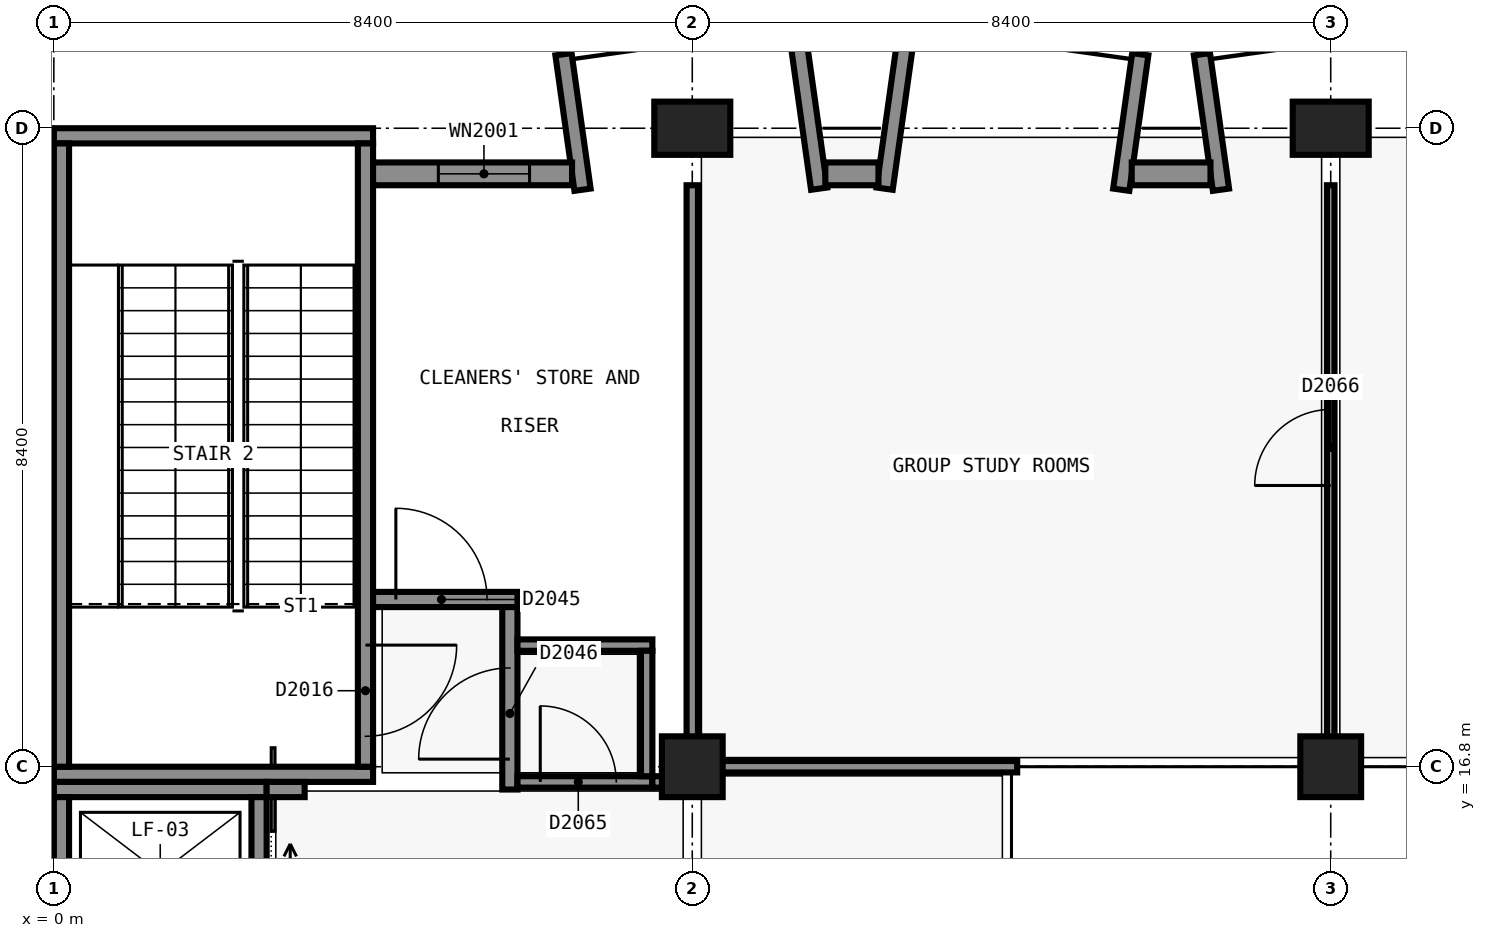
"""IFC4 building model, lengths in metres.
Left out: names, types, materials, properties, quantities, classifications, styles, units other than length and angle.
Written with IfcOpenShell. Run it as: python <this file> out.ifc"""

import sys

from ifc_helpers import new_model, si_unit, direction, frame, frame_2d, origin, origin_2d, place, context, subcontext, project, spatial, rectangle, extrude, element, fill, save


model = new_model("IFC4")
c1 = context("Model", 3, precision=1e-05, world=origin(), true_north=direction((0.0, 1.0)))
c2 = subcontext(c1, "Body", "Model", "MODEL_VIEW")
j1 = project(units=[si_unit("LENGTHUNIT", "METRE"), si_unit("PLANEANGLEUNIT", "RADIAN")], contexts=[c1])
p1 = place(None, origin())
s1 = spatial("IfcSite", under=j1, at=p1, CompositionType="ELEMENT")
p2 = place(p1, origin())
s2 = spatial("IfcBuilding", under=s1, at=p2, CompositionType="ELEMENT")
p3 = place(p2, frame((0.0, 0.0, 10.2)))
s3 = spatial("IfcBuildingStorey", under=s2, at=p3, CompositionType="ELEMENT", Elevation=10.2)
for number, where, z_axis, x_axis in (
    (1, (4.2, 16.7, 0.0), (0.0, 0.0, 1.0), (-1.0, 0.0, 0.0)),
    (2, (0.0, 25.1, 0.0), (0.0, 0.0, 1.0), (1.0, 0.0, 0.0)),
):
    element("IfcWall", number, at=place(p3, frame(where, z_axis=z_axis, x_axis=x_axis)), inside=s3, PredefinedType="SHEAR", context=c2, shape_type="SweptSolid", body=[
        extrude(rectangle(XDim=4.199, YDim=0.2, at=frame_2d((2.1, 0.0))), origin(), (0.0, 0.0, 1.0), 4.8),
    ])
p4 = place(p3, frame((0.1, 16.8, 0.0), z_axis=(0.0, 0.0, 1.0), x_axis=(0.0, 1.0, 0.0)))
e3 = element("IfcWall", 3, at=p4, inside=s3, PredefinedType="SHEAR", context=c2, shape_type="SweptSolid", body=[
    extrude(rectangle(XDim=8.2, YDim=0.2, at=frame_2d((4.1, 0.0))), origin(), (0.0, 0.0, 1.0), 4.8),
])
p5 = place(p3, frame((4.1, 25.0, 0.0), z_axis=(0.0, 0.0, 1.0), x_axis=(0.0, -1.0, 0.0)))
e4 = element("IfcWall", 4, at=p5, inside=s3, PredefinedType="SHEAR", context=c2, shape_type="SweptSolid", body=[
    extrude(rectangle(XDim=8.2, YDim=0.2, at=frame_2d((4.1, 0.0))), origin(), (0.0, 0.0, 1.0), 4.8),
])
p6 = place(p5, frame((6.6, 0.0, 0.0)))
e5 = element("IfcOpeningElement", 5, at=p6, cuts=e4, PredefinedType="OPENING", context=c2, shape_type="SweptSolid", body=[
    extrude(rectangle(XDim=1.2, YDim=2.1, at=frame_2d((0.6, 1.05))), frame((0.0, 0.11, 0.0), z_axis=(0.0, -1.0, 0.0), x_axis=(1.0, 0.0, 0.0)), (0.0, 0.0, 1.0), 0.22),
])
p7 = place(p3, frame((0.0, 16.5, 0.0), z_axis=(0.0, 0.0, 1.0), x_axis=(1.0, 0.0, 0.0)))
e6 = element("IfcWall", 6, at=p7, inside=s3, PredefinedType="SHEAR", context=c2, shape_type="SweptSolid", body=[
    extrude(rectangle(XDim=2.8, YDim=0.2, at=frame_2d((1.4, 0.0))), origin(), (0.0, 0.0, 1.0), 4.8),
])
p8 = place(p3, frame((0.1, 14.3, 0.0), z_axis=(0.0, 0.0, 1.0), x_axis=(0.0, 1.0, 0.0)))
e7 = element("IfcWall", 7, at=p8, inside=s3, PredefinedType="SHEAR", context=c2, shape_type="SweptSolid", body=[
    extrude(rectangle(XDim=2.1, YDim=0.2, at=frame_2d((1.05, 0.0))), origin(), (0.0, 0.0, 1.0), 4.8),
])
p9 = place(p3, frame((2.7, 16.4, 0.0), z_axis=(0.0, 0.0, 1.0), x_axis=(0.0, -1.0, 0.0)))
e8 = element("IfcWall", 8, at=p9, inside=s3, PredefinedType="SHEAR", context=c2, shape_type="SweptSolid", body=[
    extrude(rectangle(XDim=2.1, YDim=0.2, at=frame_2d((1.05, 0.0))), origin(), (0.0, 0.0, 1.0), 4.8),
])
p10 = place(p9, frame((0.45, 0.0, 0.0)))
e9 = element("IfcOpeningElement", 9, at=p10, cuts=e8, PredefinedType="OPENING", context=c2, shape_type="SweptSolid", body=[
    extrude(rectangle(XDim=1.1, YDim=2.1, at=frame_2d((0.55, 1.05))), frame((0.0, 0.11, 0.0), z_axis=(0.0, -1.0, 0.0), x_axis=(1.0, 0.0, 0.0)), (0.0, 0.0, 1.0), 0.22),
])
p11 = place(p3, frame((8.4, 16.8, 0.0), z_axis=(0.0, 0.0, 1.0), x_axis=(1.0, 0.0, 0.0)))
e10 = element("IfcColumn", 10, at=p11, inside=s3, PredefinedType="COLUMN", context=c2, shape_type="SweptSolid", body=[
    extrude(rectangle(XDim=0.8, YDim=0.8, at=origin_2d()), origin(), (0.0, 0.0, 1.0), 4.8),
])
p12 = place(p3, frame((8.4, 25.2, 0.0), z_axis=(0.0, 0.0, 1.0), x_axis=(1.0, 0.0, 0.0)))
e11 = element("IfcColumn", 11, at=p12, inside=s3, PredefinedType="COLUMN", context=c2, shape_type="SweptSolid", body=[
    extrude(rectangle(XDim=1.0, YDim=0.7, at=origin_2d()), origin(), (0.0, 0.0, 1.0), 4.8),
])
p13 = place(p3, frame((16.8, 16.8, 0.0), z_axis=(0.0, 0.0, 1.0), x_axis=(1.0, 0.0, 0.0)))
e12 = element("IfcColumn", 12, at=p13, inside=s3, PredefinedType="COLUMN", context=c2, shape_type="SweptSolid", body=[
    extrude(rectangle(XDim=0.8, YDim=0.8, at=origin_2d()), origin(), (0.0, 0.0, 1.0), 4.8),
])
p14 = place(p3, frame((16.8, 25.2, 0.0), z_axis=(0.0, 0.0, 1.0), x_axis=(1.0, 0.0, 0.0)))
e13 = element("IfcColumn", 13, at=p14, inside=s3, PredefinedType="COLUMN", context=c2, shape_type="SweptSolid", body=[
    extrude(rectangle(XDim=1.0, YDim=0.7, at=origin_2d()), origin(), (0.0, 0.0, 1.0), 4.8),
])
p15 = place(p3, frame((2.8, 16.5, 0.0), z_axis=(0.0, 0.0, 1.0), x_axis=(1.0, 0.0, 0.0)))
e14 = element("IfcWall", 14, at=p15, inside=s3, PredefinedType="SHEAR", context=c2, shape_type="SweptSolid", body=[
    extrude(rectangle(XDim=0.5, YDim=0.2, at=frame_2d((0.25, 0.0))), origin(), (0.0, 0.0, 1.0), 4.8),
])
p16 = place(p3, frame((6.956, 24.391, 0.0), z_axis=(0.0, 0.0, 1.0), x_axis=(-0.139161311926, 0.990269725511, 0.0)))
e15 = element("IfcWall", 15, at=p16, inside=s3, PredefinedType="SOLIDWALL", context=c2, shape_type="SweptSolid", body=[
    extrude(rectangle(XDim=1.8, YDim=0.215, at=frame_2d((0.9, 0.0))), origin(), (0.0, 0.0, 1.0), 4.5),
])
for number, where, z_axis, x_axis in (
    (16, (10.069, 24.405, 0.0), (0.0, 0.0, 1.0), (-0.139, 0.99, 0.0)),
    (17, (10.931, 24.405, 0.0), (0.0, 0.0, 1.0), (0.139, 0.99, 0.0)),
):
    element("IfcWall", number, at=place(p3, frame(where, z_axis=z_axis, x_axis=x_axis)), inside=s3, PredefinedType="SOLIDWALL", context=c2, shape_type="SweptSolid", body=[
        extrude(rectangle(XDim=2.219, YDim=0.215, at=frame_2d((1.11, 0.0))), origin(), (0.0, 0.0, 1.0), 4.5),
    ])
for number, where, z_axis, x_axis in (
    (18, (14.044, 24.391, 0.0), (0.0, 0.0, 1.0), (0.139, 0.99, 0.0)),
    (19, (15.356, 24.391, 0.0), (0.0, 0.0, 1.0), (-0.139, 0.99, 0.0)),
):
    element("IfcWall", number, at=place(p3, frame(where, z_axis=z_axis, x_axis=x_axis)), inside=s3, PredefinedType="SOLIDWALL", context=c2, shape_type="SweptSolid", body=[
        extrude(rectangle(XDim=1.8, YDim=0.215, at=frame_2d((0.9, 0.0))), origin(), (0.0, 0.0, 1.0), 4.5),
    ])
p17 = place(p3, frame((4.2, 24.6, 0.0), z_axis=(0.0, 0.0, 1.0), x_axis=(1.0, 0.0, 0.0)))
e20 = element("IfcWall", 20, at=p17, inside=s3, PredefinedType="SOLIDWALL", context=c2, shape_type="SweptSolid", body=[
    extrude(rectangle(XDim=2.618, YDim=0.3, at=frame_2d((1.309, 0.0))), origin(), (0.0, 0.0, 1.0), 4.5),
])
p18 = place(p17, frame((0.859, 0.0, 0.9)))
e21 = element("IfcOpeningElement", 21, at=p18, cuts=e20, PredefinedType="OPENING", context=c2, shape_type="SweptSolid", body=[
    extrude(rectangle(XDim=1.2, YDim=1.5, at=frame_2d((0.6, 0.75))), frame((0.0, 0.16, 0.0), z_axis=(0.0, -1.0, 0.0), x_axis=(1.0, 0.0, 0.0)), (0.0, 0.0, 1.0), 0.32),
])
p19 = place(p3, frame((10.15, 24.6, 0.0), z_axis=(0.0, 0.0, 1.0), x_axis=(1.0, 0.0, 0.0)))
e22 = element("IfcWall", 22, at=p19, inside=s3, PredefinedType="SOLIDWALL", context=c2, shape_type="SweptSolid", body=[
    extrude(rectangle(XDim=0.699, YDim=0.3, at=frame_2d((0.35, 0.0))), origin(), (0.0, 0.0, 1.0), 4.5),
])
p20 = place(p3, frame((14.182, 24.6, 0.0), z_axis=(0.0, 0.0, 1.0), x_axis=(1.0, 0.0, 0.0)))
e23 = element("IfcWall", 23, at=p20, inside=s3, PredefinedType="SOLIDWALL", context=c2, shape_type="SweptSolid", body=[
    extrude(rectangle(XDim=1.036, YDim=0.3, at=frame_2d((0.518, 0.0))), origin(), (0.0, 0.0, 1.0), 4.5),
])
p21 = place(p3, frame((4.2, 19.0, 0.0), z_axis=(0.0, 0.0, 1.0), x_axis=(1.0, 0.0, 0.0)))
e24 = element("IfcWall", 24, at=p21, inside=s3, PredefinedType="SOLIDWALL", context=c2, shape_type="SweptSolid", body=[
    extrude(rectangle(XDim=1.9, YDim=0.2, at=frame_2d((0.95, 0.0))), origin(), (0.0, 0.0, 1.0), 4.5),
])
p22 = place(p21, frame((0.3, 0.0, 0.0)))
e25 = element("IfcOpeningElement", 25, at=p22, cuts=e24, PredefinedType="OPENING", context=c2, shape_type="SweptSolid", body=[
    extrude(rectangle(XDim=1.2, YDim=2.1, at=frame_2d((0.6, 1.05))), frame((0.0, 0.11, 0.0), z_axis=(0.0, -1.0, 0.0), x_axis=(1.0, 0.0, 0.0)), (0.0, 0.0, 1.0), 0.22),
])
p23 = place(p3, frame((6.0, 16.5, 0.0), z_axis=(0.0, 0.0, 1.0), x_axis=(0.0, 1.0, 0.0)))
e26 = element("IfcWall", 26, at=p23, inside=s3, PredefinedType="SOLIDWALL", context=c2, shape_type="SweptSolid", body=[
    extrude(rectangle(XDim=2.4, YDim=0.2, at=frame_2d((1.2, 0.0))), origin(), (0.0, 0.0, 1.0), 4.0),
])
p24 = place(p23, frame((0.4, 0.0, 0.0)))
e27 = element("IfcOpeningElement", 27, at=p24, cuts=e26, PredefinedType="OPENING", context=c2, shape_type="SweptSolid", body=[
    extrude(rectangle(XDim=1.2, YDim=2.1, at=frame_2d((0.6, 1.05))), frame((0.0, 0.11, 0.0), z_axis=(0.0, -1.0, 0.0), x_axis=(1.0, 0.0, 0.0)), (0.0, 0.0, 1.0), 0.22),
])
p25 = place(p3, frame((6.1, 16.6, 0.0), z_axis=(0.0, 0.0, 1.0), x_axis=(1.0, 0.0, 0.0)))
e28 = element("IfcWall", 28, at=p25, inside=s3, PredefinedType="PARTITIONING", context=c2, shape_type="SweptSolid", body=[
    extrude(rectangle(XDim=1.775, YDim=0.15, at=frame_2d((0.887, 0.0))), origin(), (0.0, 0.0, 1.0), 4.0),
])
p26 = place(p25, frame((0.3, 0.0, 0.0)))
e29 = element("IfcOpeningElement", 29, at=p26, cuts=e28, PredefinedType="OPENING", context=c2, shape_type="SweptSolid", body=[
    extrude(rectangle(XDim=1.0, YDim=2.1, at=frame_2d((0.5, 1.05))), frame((0.0, 0.085, 0.0), z_axis=(0.0, -1.0, 0.0), x_axis=(1.0, 0.0, 0.0)), (0.0, 0.0, 1.0), 0.17),
])
p27 = place(p3, frame((8.325, 16.8, 0.0), z_axis=(0.0, 0.0, 1.0), x_axis=(1.0, 0.0, 0.0)))
e30 = element("IfcWall", 30, at=p27, inside=s3, PredefinedType="PARTITIONING", context=c2, shape_type="SweptSolid", body=[
    extrude(rectangle(XDim=4.35, YDim=0.15, at=frame_2d((2.175, 0.0))), origin(), (0.0, 0.0, 1.0), 3.8),
])
p28 = place(p3, frame((7.875, 16.6, 0.0), z_axis=(0.0, 0.0, 1.0), x_axis=(1.0, 0.0, 0.0)))
e31 = element("IfcWall", 31, at=p28, inside=s3, PredefinedType="SOLIDWALL", context=c2, shape_type="SweptSolid", body=[
    extrude(rectangle(XDim=0.6, YDim=0.15, at=frame_2d((0.3, 0.0))), origin(), (0.0, 0.0, 1.0), 3.8),
])
p29 = place(p3, frame((6.1, 18.4, 0.0), z_axis=(0.0, 0.0, 1.0), x_axis=(1.0, 0.0, 0.0)))
e32 = element("IfcWall", 32, at=p29, inside=s3, PredefinedType="SOLIDWALL", context=c2, shape_type="SweptSolid", body=[
    extrude(rectangle(XDim=1.775, YDim=0.15, at=frame_2d((0.887, 0.0))), origin(), (0.0, 0.0, 1.0), 4.5),
])
p30 = place(p3, frame((7.8, 16.675, 0.0), z_axis=(0.0, 0.0, 1.0), x_axis=(0.0, 1.0, 0.0)))
e33 = element("IfcWall", 33, at=p30, inside=s3, PredefinedType="SOLIDWALL", context=c2, shape_type="SweptSolid", body=[
    extrude(rectangle(XDim=1.65, YDim=0.15, at=frame_2d((0.825, 0.0))), origin(), (0.0, 0.0, 1.0), 4.0),
])
p31 = place(p3, frame((8.4, 16.875, 0.0), z_axis=(0.0, 0.0, 1.0), x_axis=(0.0, 1.0, 0.0)))
e34 = element("IfcWall", 34, at=p31, inside=s3, PredefinedType="SOLIDWALL", context=c2, shape_type="SweptSolid", body=[
    extrude(rectangle(XDim=7.575, YDim=0.15, at=frame_2d((3.788, 0.0))), origin(), (0.0, 0.0, 1.0), 3.8),
])
p32 = place(p3, frame((16.8, 16.75, 0.0), z_axis=(0.0, 0.0, 1.0), x_axis=(0.0, 1.0, 0.0)))
e35 = element("IfcWall", 35, at=p32, inside=s3, PredefinedType="PARTITIONING", context=c2, shape_type="SweptSolid", body=[
    extrude(rectangle(XDim=7.7, YDim=0.1, at=frame_2d((3.85, 0.0))), origin(), (0.0, 0.0, 1.0), 3.8),
])
p33 = place(p32, frame((3.75, 0.0, 0.0)))
e36 = element("IfcOpeningElement", 36, at=p33, cuts=e35, PredefinedType="OPENING", context=c2, shape_type="SweptSolid", body=[
    extrude(rectangle(XDim=1.0, YDim=2.1, at=frame_2d((0.5, 1.05))), frame((0.0, 0.06, 0.0), z_axis=(0.0, -1.0, 0.0), x_axis=(1.0, 0.0, 0.0)), (0.0, 0.0, 1.0), 0.12),
])
p34 = place(p18, origin())
e37 = element("IfcWindow", 37, at=p34, inside=s3, PartitioningType="SINGLE_PANEL", PredefinedType="WINDOW", context=c2, shape_type="SweptSolid", body=[
    extrude(rectangle(XDim=1.2, YDim=1.5, at=frame_2d((0.6, 0.75))), frame((0.0, 0.03, 0.0), z_axis=(0.0, -1.0, 0.0), x_axis=(1.0, 0.0, 0.0)), (0.0, 0.0, 1.0), 0.06),
])
fill(e21, e37)
p35 = place(p10, origin())
e38 = element("IfcDoor", 38, at=p35, inside=s3, OperationType="SLIDING_TO_LEFT", PredefinedType="DOOR", context=c2, shape_type="SweptSolid", body=[
    extrude(rectangle(XDim=1.1, YDim=2.1, at=frame_2d((0.55, 1.05))), frame((0.0, 0.025, 0.0), z_axis=(0.0, -1.0, 0.0), x_axis=(1.0, 0.0, 0.0)), (0.0, 0.0, 1.0), 0.05),
])
fill(e9, e38)
p36 = place(p6, origin())
e39 = element("IfcDoor", 39, at=p36, inside=s3, OperationType="SINGLE_SWING_RIGHT", PredefinedType="DOOR", context=c2, shape_type="SweptSolid", body=[
    extrude(rectangle(XDim=1.2, YDim=2.1, at=frame_2d((0.6, 1.05))), frame((0.0, 0.025, 0.0), z_axis=(0.0, -1.0, 0.0), x_axis=(1.0, 0.0, 0.0)), (0.0, 0.0, 1.0), 0.05),
])
fill(e5, e39)
p37 = place(p22, origin())
e40 = element("IfcDoor", 40, at=p37, inside=s3, OperationType="SINGLE_SWING_LEFT", PredefinedType="DOOR", context=c2, shape_type="SweptSolid", body=[
    extrude(rectangle(XDim=1.2, YDim=2.1, at=frame_2d((0.6, 1.05))), frame((0.0, 0.025, 0.0), z_axis=(0.0, -1.0, 0.0), x_axis=(1.0, 0.0, 0.0)), (0.0, 0.0, 1.0), 0.05),
])
fill(e25, e40)
p38 = place(p24, origin())
e41 = element("IfcDoor", 41, at=p38, inside=s3, OperationType="SINGLE_SWING_RIGHT", PredefinedType="DOOR", context=c2, shape_type="SweptSolid", body=[
    extrude(rectangle(XDim=1.2, YDim=2.1, at=frame_2d((0.6, 1.05))), frame((0.0, 0.025, 0.0), z_axis=(0.0, -1.0, 0.0), x_axis=(1.0, 0.0, 0.0)), (0.0, 0.0, 1.0), 0.05),
])
fill(e27, e41)
p39 = place(p26, origin())
e42 = element("IfcDoor", 42, at=p39, inside=s3, OperationType="SINGLE_SWING_RIGHT", PredefinedType="DOOR", context=c2, shape_type="SweptSolid", body=[
    extrude(rectangle(XDim=1.0, YDim=2.1, at=frame_2d((0.5, 1.05))), frame((0.0, 0.025, 0.0), z_axis=(0.0, -1.0, 0.0), x_axis=(1.0, 0.0, 0.0)), (0.0, 0.0, 1.0), 0.05),
])
fill(e29, e42)
p40 = place(p33, origin())
e43 = element("IfcDoor", 43, at=p40, inside=s3, OperationType="SINGLE_SWING_RIGHT", PredefinedType="DOOR", context=c2, shape_type="SweptSolid", body=[
    extrude(rectangle(XDim=1.0, YDim=2.1, at=frame_2d((0.5, 1.05))), frame((0.0, 0.025, 0.0), z_axis=(0.0, -1.0, 0.0), x_axis=(1.0, 0.0, 0.0)), (0.0, 0.0, 1.0), 0.05),
])
fill(e36, e43)
save(model, sys.argv[1])
